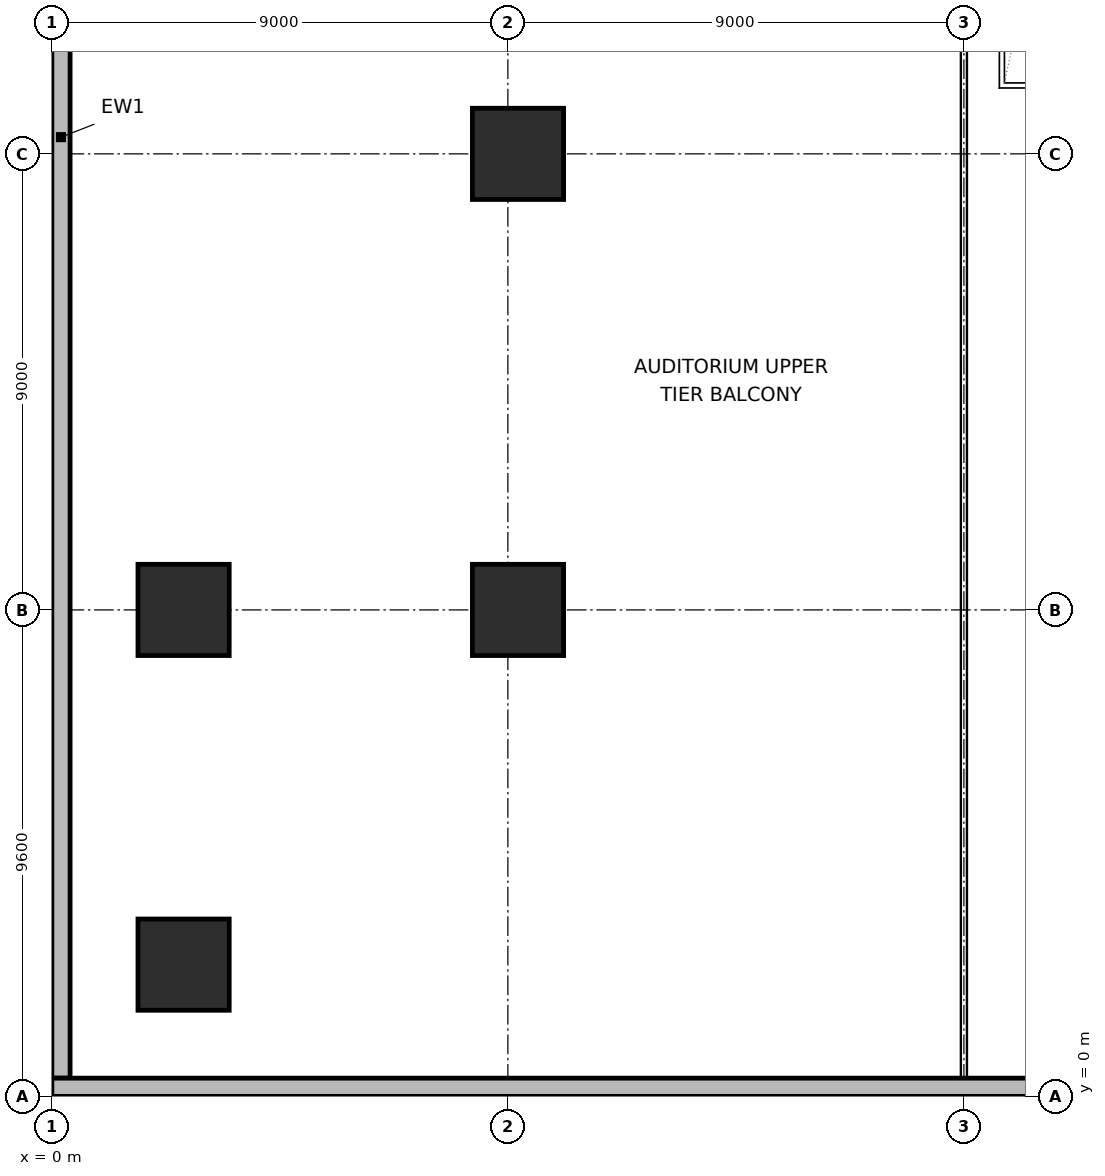
"""IFC4 building model, lengths in metres.
Left out: names, types, materials, properties, quantities, classifications, styles, units other than length and angle.
Written with IfcOpenShell. Run it as: python <this file> out.ifc"""

import sys

from ifc_helpers import new_model, si_unit, direction, frame, frame_2d, origin, origin_2d, place, context, subcontext, project, spatial, rectangle, extrude, element, save


model = new_model("IFC4")
c1 = context("Model", 3, precision=1e-05, world=origin(), true_north=direction((0.0, 1.0)))
c2 = subcontext(c1, "Body", "Model", "MODEL_VIEW")
j1 = project(units=[si_unit("LENGTHUNIT", "METRE"), si_unit("PLANEANGLEUNIT", "RADIAN")], contexts=[c1])
p1 = place(None, origin())
s1 = spatial("IfcSite", under=j1, at=p1, CompositionType="ELEMENT")
p2 = place(p1, origin())
s2 = spatial("IfcBuilding", under=s1, at=p2, CompositionType="ELEMENT")
p3 = place(p2, frame((0.0, 0.0, 8.7)))
s3 = spatial("IfcBuildingStorey", under=s2, at=p3, CompositionType="ELEMENT", Elevation=8.7)
for number, where, z_axis, x_axis in (
    (1, (2.6, 2.6, 0.0), (0.0, 0.0, 1.0), (1.0, 0.0, 0.0)),
    (2, (2.6, 9.6, 0.0), (0.0, 0.0, 1.0), (1.0, 0.0, 0.0)),
    (3, (9.2, 9.6, 0.0), (0.0, 0.0, 1.0), (1.0, 0.0, 0.0)),
    (4, (9.2, 18.6, 0.0), (0.0, 0.0, 1.0), (1.0, 0.0, 0.0)),
):
    element("IfcColumn", number, at=place(p3, frame(where, z_axis=z_axis, x_axis=x_axis)), inside=s3, PredefinedType="COLUMN", context=c2, shape_type="SweptSolid", body=[
        extrude(rectangle(XDim=1.8, YDim=1.8, at=origin_2d()), origin(), (0.0, 0.0, 1.0), 4.2),
    ])
p4 = place(p3, frame((0.18, 0.36, 0.0), z_axis=(0.0, 0.0, 1.0), x_axis=(0.0, 1.0, 0.0)))
e5 = element("IfcWall", 5, at=p4, inside=s3, PredefinedType="SOLIDWALL", context=c2, shape_type="SweptSolid", body=[
    extrude(rectangle(XDim=71.28, YDim=0.36, at=frame_2d((35.64, 0.0))), origin(), (0.0, 0.0, 1.0), 3.88),
])
p5 = place(p3, frame((39.72, 0.18, 0.0), z_axis=(0.0, 0.0, 1.0), x_axis=(-1.0, 0.0, 0.0)))
e6 = element("IfcWall", 6, at=p5, inside=s3, PredefinedType="SOLIDWALL", context=c2, shape_type="SweptSolid", body=[
    extrude(rectangle(XDim=39.72, YDim=0.36, at=frame_2d((19.86, 0.0))), origin(), (0.0, 0.0, 1.0), 3.88),
])
save(model, sys.argv[1])
